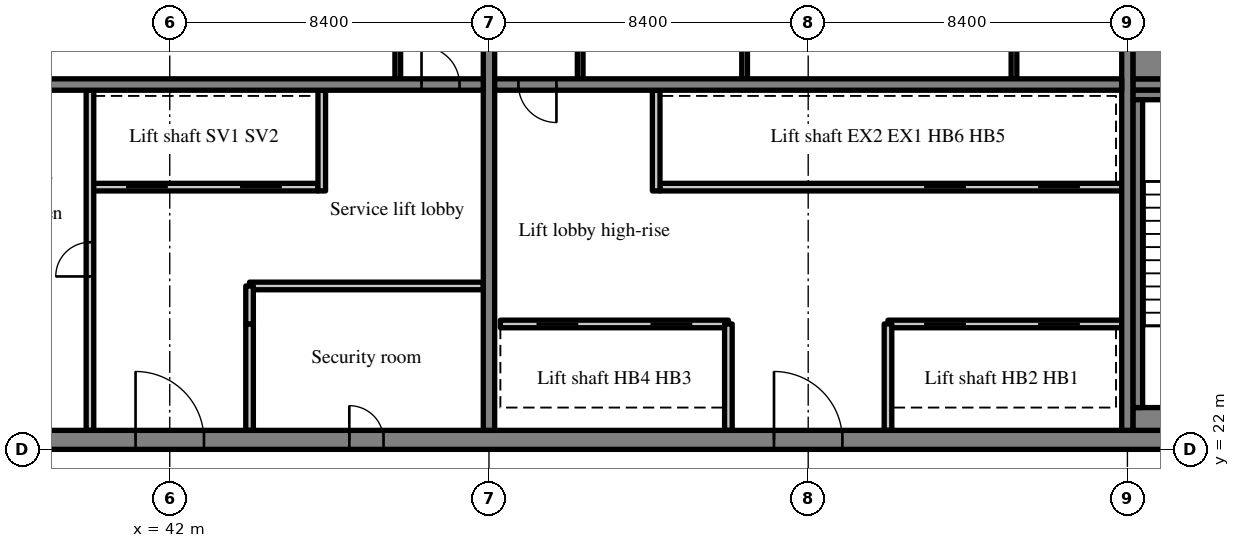
"""IFC4 building model, lengths in metres.
Left out: names, types, materials, properties, quantities, classifications, styles, units other than length and angle.
Written with IfcOpenShell. Run it as: python <this file> out.ifc"""

import sys

from ifc_helpers import new_model, si_unit, direction, frame, frame_2d, origin, place, context, subcontext, project, spatial, rectangle, extrude, source, transform, mapped, element, fill, save


model = new_model("IFC4")
c1 = context("Model", 3, precision=1e-05, world=origin(), true_north=direction((0.0, 1.0)))
c2 = subcontext(c1, "Body", "Model", "MODEL_VIEW")
j1 = project(units=[si_unit("LENGTHUNIT", "METRE"), si_unit("PLANEANGLEUNIT", "RADIAN")], contexts=[c1])
p1 = place(None, origin())
s1 = spatial("IfcSite", under=j1, at=p1, CompositionType="ELEMENT")
p2 = place(p1, origin())
s2 = spatial("IfcBuilding", under=s1, at=p2, CompositionType="ELEMENT")
p3 = place(p2, frame((0.0, 0.0, 289.7)))
s3 = spatial("IfcBuildingStorey", under=s2, at=p3, CompositionType="ELEMENT", Elevation=289.7)
m1 = source(origin(), c2, "Body", "SweptSolid", [
    extrude(rectangle(XDim=50.4, YDim=0.5, at=frame_2d((25.2, 0.0))), origin(), (0.0, 0.0, 1.0), 3.72),
])
p4 = place(p3, frame((25.2, 22.25, 0.0), z_axis=(0.0, 0.0, 1.0), x_axis=(1.0, 0.0, 0.0)))
e1 = element("IfcWall", 1, at=p4, inside=s3, PredefinedType="SHEAR", context=c2, shape_type="MappedRepresentation", body=[
    mapped(m1, transform((0.0, 0.0, 0.0), scale=1.0)),
])
m2 = source(origin(), c2, "Body", "SweptSolid", [
    extrude(rectangle(XDim=1.8, YDim=2.1, at=frame_2d((0.9, 1.05))), frame((0.0, 0.26, 0.0), z_axis=(0.0, -1.0, 0.0), x_axis=(1.0, 0.0, 0.0)), (0.0, 0.0, 1.0), 0.52),
])
p5 = place(p4, frame((15.9, 0.0, 0.0)))
e2 = element("IfcOpeningElement", 2, at=p5, cuts=e1, PredefinedType="OPENING", context=c2, shape_type="MappedRepresentation", body=[
    mapped(m2, transform((0.0, 0.0, 0.0), scale=1.0)),
])
m3 = source(origin(), c2, "Body", "SweptSolid", [
    extrude(rectangle(XDim=0.9, YDim=2.1, at=frame_2d((0.45, 1.05))), frame((0.0, 0.26, 0.0), z_axis=(0.0, -1.0, 0.0), x_axis=(1.0, 0.0, 0.0)), (0.0, 0.0, 1.0), 0.52),
])
p6 = place(p4, frame((9.675, 0.0, 0.0)))
e3 = element("IfcOpeningElement", 3, at=p6, cuts=e1, PredefinedType="OPENING", context=c2, shape_type="MappedRepresentation", body=[
    mapped(m3, transform((0.0, 0.0, 0.0), scale=1.0)),
])
p7 = place(p4, frame((21.525, 0.0, 0.0)))
e4 = element("IfcOpeningElement", 4, at=p7, cuts=e1, PredefinedType="OPENING", context=c2, shape_type="MappedRepresentation", body=[
    mapped(m3, transform((0.0, 0.0, 0.0), scale=1.0)),
])
p8 = place(p4, frame((32.7, 0.0, 0.0)))
e5 = element("IfcOpeningElement", 5, at=p8, cuts=e1, PredefinedType="OPENING", context=c2, shape_type="MappedRepresentation", body=[
    mapped(m2, transform((0.0, 0.0, 0.0), scale=1.0)),
])
m4 = source(origin(), c2, "Body", "SweptSolid", [
    extrude(rectangle(XDim=1.2, YDim=2.1, at=frame_2d((0.6, 1.05))), frame((0.0, 0.26, 0.0), z_axis=(0.0, -1.0, 0.0), x_axis=(1.0, 0.0, 0.0)), (0.0, 0.0, 1.0), 0.52),
])
p9 = place(p4, frame((6.5, 0.0, 0.0)))
e6 = element("IfcOpeningElement", 6, at=p9, cuts=e1, PredefinedType="OPENING", context=c2, shape_type="MappedRepresentation", body=[
    mapped(m4, transform((0.0, 0.0, 0.0), scale=1.0)),
])
p10 = place(p4, frame((47.975, 0.0, 0.0)))
e7 = element("IfcOpeningElement", 7, at=p10, cuts=e1, PredefinedType="OPENING", context=c2, shape_type="MappedRepresentation", body=[
    mapped(m4, transform((0.0, 0.0, 0.0), scale=1.0)),
])
m5 = source(origin(), c2, "Body", "SweptSolid", [
    extrude(rectangle(XDim=19.0, YDim=0.3, at=frame_2d((9.5, 0.0))), origin(), (0.0, 0.0, 1.0), 3.72),
])
p11 = place(p3, frame((50.4, 22.5, 0.0), z_axis=(0.0, 0.0, 1.0), x_axis=(0.0, 1.0, 0.0)))
e8 = element("IfcWall", 8, at=p11, inside=s3, PredefinedType="SHEAR", context=c2, shape_type="MappedRepresentation", body=[
    mapped(m5, transform((0.0, 0.0, 0.0), scale=1.0)),
])
m6 = source(origin(), c2, "Body", "SweptSolid", [
    extrude(rectangle(XDim=1.1, YDim=2.1, at=frame_2d((0.55, 1.05))), frame((0.0, 0.16, 0.0), z_axis=(0.0, -1.0, 0.0), x_axis=(1.0, 0.0, 0.0)), (0.0, 0.0, 1.0), 0.32),
])
p12 = place(p11, frame((12.95, 0.0, 0.0)))
e9 = element("IfcOpeningElement", 9, at=p12, cuts=e8, PredefinedType="OPENING", context=c2, shape_type="MappedRepresentation", body=[
    mapped(m6, transform((0.0, 0.0, 0.0), scale=1.0)),
])
p13 = place(p3, frame((67.2, 22.5, 0.0), z_axis=(0.0, 0.0, 1.0), x_axis=(0.0, 1.0, 0.0)))
e10 = element("IfcWall", 10, at=p13, inside=s3, PredefinedType="SHEAR", context=c2, shape_type="MappedRepresentation", body=[
    mapped(m5, transform((0.0, 0.0, 0.0), scale=1.0)),
])
m7 = source(origin(), c2, "Body", "SweptSolid", [
    extrude(rectangle(XDim=16.5, YDim=0.3, at=frame_2d((8.25, 0.0))), origin(), (0.0, 0.0, 1.0), 3.72),
])
p14 = place(p3, frame((33.75, 31.6, 0.0), z_axis=(0.0, 0.0, 1.0), x_axis=(1.0, 0.0, 0.0)))
e11 = element("IfcWall", 11, at=p14, inside=s3, PredefinedType="SHEAR", context=c2, shape_type="MappedRepresentation", body=[
    mapped(m7, transform((0.0, 0.0, 0.0), scale=1.0)),
])
m8 = source(origin(), c2, "Body", "SweptSolid", [
    extrude(rectangle(XDim=1.0, YDim=2.1, at=frame_2d((0.5, 1.05))), frame((0.0, 0.16, 0.0), z_axis=(0.0, -1.0, 0.0), x_axis=(1.0, 0.0, 0.0)), (0.0, 0.0, 1.0), 0.32),
])
p15 = place(p14, frame((14.875, 0.0, 0.0)))
e12 = element("IfcOpeningElement", 12, at=p15, cuts=e11, PredefinedType="OPENING", context=c2, shape_type="MappedRepresentation", body=[
    mapped(m8, transform((0.0, 0.0, 0.0), scale=1.0)),
])
p16 = place(p3, frame((50.55, 31.6, 0.0), z_axis=(0.0, 0.0, 1.0), x_axis=(1.0, 0.0, 0.0)))
e13 = element("IfcWall", 13, at=p16, inside=s3, PredefinedType="SHEAR", context=c2, shape_type="MappedRepresentation", body=[
    mapped(m7, transform((0.0, 0.0, 0.0), scale=1.0)),
])
p17 = place(p16, frame((0.625, 0.0, 0.0)))
e14 = element("IfcOpeningElement", 14, at=p17, cuts=e13, PredefinedType="OPENING", context=c2, shape_type="MappedRepresentation", body=[
    mapped(m8, transform((0.0, 0.0, 0.0), scale=1.0)),
])
m9 = source(origin(), c2, "Body", "SweptSolid", [
    extrude(rectangle(XDim=7.75, YDim=0.3, at=frame_2d((3.875, 0.0))), origin(), (0.0, 0.0, 1.0), 3.72),
])
p18 = place(p3, frame((67.35, 31.6, 0.0), z_axis=(0.0, 0.0, 1.0), x_axis=(1.0, 0.0, 0.0)))
e15 = element("IfcWall", 15, at=p18, inside=s3, PredefinedType="SHEAR", context=c2, shape_type="MappedRepresentation", body=[
    mapped(m9, transform((0.0, 0.0, 0.0), scale=1.0)),
])
p19 = place(p18, frame((5.875, 0.0, 0.0)))
e16 = element("IfcOpeningElement", 16, at=p19, cuts=e15, PredefinedType="OPENING", context=c2, shape_type="MappedRepresentation", body=[
    mapped(m6, transform((0.0, 0.0, 0.0), scale=1.0)),
])
m10 = source(origin(), c2, "Body", "SweptSolid", [
    extrude(rectangle(XDim=6.0, YDim=0.2, at=frame_2d((3.0, 0.0))), origin(), (0.0, 0.0, 1.0), 3.72),
])
p20 = place(p3, frame((39.9, 28.9, 0.0), z_axis=(0.0, 0.0, 1.0), x_axis=(1.0, 0.0, 0.0)))
e17 = element("IfcWall", 17, at=p20, inside=s3, PredefinedType="SOLIDWALL", context=c2, shape_type="MappedRepresentation", body=[
    mapped(m10, transform((0.0, 0.0, 0.0), scale=1.0)),
])
m11 = source(origin(), c2, "Body", "SweptSolid", [
    extrude(rectangle(XDim=1.1, YDim=2.1, at=frame_2d((0.55, 1.05))), frame((0.0, 0.11, 0.0), z_axis=(0.0, -1.0, 0.0), x_axis=(1.0, 0.0, 0.0)), (0.0, 0.0, 1.0), 0.22),
])
p21 = place(p20, frame((0.95, 0.0, 0.0)))
e18 = element("IfcOpeningElement", 18, at=p21, cuts=e17, PredefinedType="OPENING", context=c2, shape_type="MappedRepresentation", body=[
    mapped(m11, transform((0.0, 0.0, 0.0), scale=1.0)),
])
p22 = place(p20, frame((3.95, 0.0, 0.0)))
e19 = element("IfcOpeningElement", 19, at=p22, cuts=e17, PredefinedType="OPENING", context=c2, shape_type="MappedRepresentation", body=[
    mapped(m11, transform((0.0, 0.0, 0.0), scale=1.0)),
])
m12 = source(origin(), c2, "Body", "SweptSolid", [
    extrude(rectangle(XDim=8.95, YDim=0.2, at=frame_2d((4.475, 0.0))), origin(), (0.0, 0.0, 1.0), 3.72),
])
p23 = place(p3, frame((39.9, 22.5, 0.0), z_axis=(0.0, 0.0, 1.0), x_axis=(0.0, 1.0, 0.0)))
e20 = element("IfcWall", 20, at=p23, inside=s3, PredefinedType="PARTITIONING", context=c2, shape_type="MappedRepresentation", body=[
    mapped(m12, transform((0.0, 0.0, 0.0), scale=1.0)),
])
m13 = source(origin(), c2, "Body", "SweptSolid", [
    extrude(rectangle(XDim=0.9, YDim=2.1, at=frame_2d((0.45, 1.05))), frame((0.0, 0.11, 0.0), z_axis=(0.0, -1.0, 0.0), x_axis=(1.0, 0.0, 0.0)), (0.0, 0.0, 1.0), 0.22),
])
p24 = place(p23, frame((4.05, 0.0, 0.0)))
e21 = element("IfcOpeningElement", 21, at=p24, cuts=e20, PredefinedType="OPENING", context=c2, shape_type="MappedRepresentation", body=[
    mapped(m13, transform((0.0, 0.0, 0.0), scale=1.0)),
])
m14 = source(origin(), c2, "Body", "SweptSolid", [
    extrude(rectangle(XDim=2.8, YDim=0.2, at=frame_2d((1.4, 0.0))), origin(), (0.0, 0.0, 1.0), 3.72),
])
p25 = place(p3, frame((44.1, 22.5, 0.0), z_axis=(0.0, 0.0, 1.0), x_axis=(0.0, 1.0, 0.0)))
e22 = element("IfcWall", 22, at=p25, inside=s3, PredefinedType="PARTITIONING", context=c2, shape_type="MappedRepresentation", body=[
    mapped(m14, transform((0.0, 0.0, 0.0), scale=1.0)),
])
m15 = source(origin(), c2, "Body", "SweptSolid", [
    extrude(rectangle(XDim=2.65, YDim=0.2, at=frame_2d((1.325, 0.0))), origin(), (0.0, 0.0, 1.0), 3.72),
])
p26 = place(p3, frame((46.0, 28.8, 0.0), z_axis=(0.0, 0.0, 1.0), x_axis=(0.0, 1.0, 0.0)))
e23 = element("IfcWall", 23, at=p26, inside=s3, PredefinedType="SOLIDWALL", context=c2, shape_type="MappedRepresentation", body=[
    mapped(m15, transform((0.0, 0.0, 0.0), scale=1.0)),
])
m16 = source(origin(), c2, "Body", "SweptSolid", [
    extrude(rectangle(XDim=6.15, YDim=0.2, at=frame_2d((3.075, 0.0))), origin(), (0.0, 0.0, 1.0), 3.72),
])
p27 = place(p3, frame((44.1, 26.3, 0.0), z_axis=(0.0, 0.0, 1.0), x_axis=(1.0, 0.0, 0.0)))
e24 = element("IfcWall", 24, at=p27, inside=s3, PredefinedType="PARTITIONING", context=c2, shape_type="MappedRepresentation", body=[
    mapped(m16, transform((0.0, 0.0, 0.0), scale=1.0)),
])
m17 = source(origin(), c2, "Body", "SweptSolid", [
    extrude(rectangle(XDim=1.0, YDim=0.2, at=frame_2d((0.5, 0.0))), origin(), (0.0, 0.0, 1.0), 3.72),
])
p28 = place(p3, frame((44.1, 25.3, 0.0), z_axis=(0.0, 0.0, 1.0), x_axis=(0.0, 1.0, 0.0)))
e25 = element("IfcWall", 25, at=p28, inside=s3, PredefinedType="PARTITIONING", context=c2, shape_type="MappedRepresentation", body=[
    mapped(m17, transform((0.0, 0.0, 0.0), scale=1.0)),
])
m18 = source(origin(), c2, "Body", "SweptSolid", [
    extrude(rectangle(XDim=3.25, YDim=0.15, at=frame_2d((1.625, 0.0))), origin(), (0.0, 0.0, 1.0), 3.72),
])
p29 = place(p3, frame((48.0, 31.75, 0.0), z_axis=(0.0, 0.0, 1.0), x_axis=(0.0, 1.0, 0.0)))
e26 = element("IfcWall", 26, at=p29, inside=s3, PredefinedType="PARTITIONING", context=c2, shape_type="MappedRepresentation", body=[
    mapped(m18, transform((0.0, 0.0, 0.0), scale=1.0)),
])
m19 = source(origin(), c2, "Body", "SweptSolid", [
    extrude(rectangle(XDim=6.15, YDim=0.2, at=frame_2d((3.075, 0.0))), origin(), (0.0, 0.0, 1.0), 3.72),
])
p30 = place(p3, frame((67.05, 25.3, 0.0), z_axis=(0.0, 0.0, 1.0), x_axis=(-1.0, 0.0, 0.0)))
e27 = element("IfcWall", 27, at=p30, inside=s3, PredefinedType="SOLIDWALL", context=c2, shape_type="MappedRepresentation", body=[
    mapped(m19, transform((0.0, 0.0, 0.0), scale=1.0)),
])
p31 = place(p30, frame((1.1, 0.0, 0.0)))
e28 = element("IfcOpeningElement", 28, at=p31, cuts=e27, PredefinedType="OPENING", context=c2, shape_type="MappedRepresentation", body=[
    mapped(m11, transform((0.0, 0.0, 0.0), scale=1.0)),
])
p32 = place(p30, frame((4.1, 0.0, 0.0)))
e29 = element("IfcOpeningElement", 29, at=p32, cuts=e27, PredefinedType="OPENING", context=c2, shape_type="MappedRepresentation", body=[
    mapped(m11, transform((0.0, 0.0, 0.0), scale=1.0)),
])
p33 = place(p3, frame((56.7, 25.3, 0.0), z_axis=(0.0, 0.0, 1.0), x_axis=(-1.0, 0.0, 0.0)))
e30 = element("IfcWall", 30, at=p33, inside=s3, PredefinedType="SOLIDWALL", context=c2, shape_type="MappedRepresentation", body=[
    mapped(m10, transform((0.0, 0.0, 0.0), scale=1.0)),
])
p34 = place(p33, frame((0.95, 0.0, 0.0)))
e31 = element("IfcOpeningElement", 31, at=p34, cuts=e30, PredefinedType="OPENING", context=c2, shape_type="MappedRepresentation", body=[
    mapped(m11, transform((0.0, 0.0, 0.0), scale=1.0)),
])
p35 = place(p33, frame((3.95, 0.0, 0.0)))
e32 = element("IfcOpeningElement", 32, at=p35, cuts=e30, PredefinedType="OPENING", context=c2, shape_type="MappedRepresentation", body=[
    mapped(m11, transform((0.0, 0.0, 0.0), scale=1.0)),
])
m20 = source(origin(), c2, "Body", "SweptSolid", [
    extrude(rectangle(XDim=12.15, YDim=0.2, at=frame_2d((6.075, 0.0))), origin(), (0.0, 0.0, 1.0), 3.72),
])
p36 = place(p3, frame((67.05, 28.9, 0.0), z_axis=(0.0, 0.0, 1.0), x_axis=(-1.0, 0.0, 0.0)))
e33 = element("IfcWall", 33, at=p36, inside=s3, PredefinedType="SOLIDWALL", context=c2, shape_type="MappedRepresentation", body=[
    mapped(m20, transform((0.0, 0.0, 0.0), scale=1.0)),
])
p37 = place(p36, frame((1.1, 0.0, 0.0)))
e34 = element("IfcOpeningElement", 34, at=p37, cuts=e33, PredefinedType="OPENING", context=c2, shape_type="MappedRepresentation", body=[
    mapped(m11, transform((0.0, 0.0, 0.0), scale=1.0)),
])
p38 = place(p36, frame((4.1, 0.0, 0.0)))
e35 = element("IfcOpeningElement", 35, at=p38, cuts=e33, PredefinedType="OPENING", context=c2, shape_type="MappedRepresentation", body=[
    mapped(m11, transform((0.0, 0.0, 0.0), scale=1.0)),
])
for number, where, z_axis, x_axis in (
    (36, (60.9, 22.5, 0.0), (0.0, 0.0, 1.0), (0.0, 1.0, 0.0)),
    (37, (56.7, 22.5, 0.0), (0.0, 0.0, 1.0), (0.0, 1.0, 0.0)),
):
    element("IfcWall", number, at=place(p3, frame(where, z_axis=z_axis, x_axis=x_axis)), inside=s3, PredefinedType="SOLIDWALL", context=c2, shape_type="MappedRepresentation", body=[
        mapped(m14, transform((0.0, 0.0, 0.0), scale=1.0)),
    ])
p39 = place(p3, frame((54.8, 28.8, 0.0), z_axis=(0.0, 0.0, 1.0), x_axis=(0.0, 1.0, 0.0)))
e38 = element("IfcWall", 38, at=p39, inside=s3, PredefinedType="SOLIDWALL", context=c2, shape_type="MappedRepresentation", body=[
    mapped(m15, transform((0.0, 0.0, 0.0), scale=1.0)),
])
for number, where, z_axis, x_axis in (
    (39, (52.8, 31.75, 0.0), (0.0, 0.0, 1.0), (0.0, 1.0, 0.0)),
    (40, (64.215, 31.75, 0.0), (0.0, 0.0, 1.0), (0.0, 1.0, 0.0)),
    (41, (57.127, 31.75, 0.0), (0.0, 0.0, 1.0), (0.0, 1.0, 0.0)),
):
    element("IfcWall", number, at=place(p3, frame(where, z_axis=z_axis, x_axis=x_axis)), inside=s3, PredefinedType="PARTITIONING", context=c2, shape_type="MappedRepresentation", body=[
        mapped(m18, transform((0.0, 0.0, 0.0), scale=1.0)),
    ])
m21 = source(origin(), c2, "Body", "SweptSolid", [
    extrude(rectangle(XDim=4.9, YDim=0.6, at=frame_2d((2.45, 0.0))), origin(), (0.0, 0.0, 1.0), 3.72),
])
p40 = place(p3, frame((67.35, 22.8, 0.0), z_axis=(0.0, 0.0, 1.0), x_axis=(1.0, 0.0, 0.0)))
e42 = element("IfcWall", 42, at=p40, inside=s3, PredefinedType="SOLIDWALL", context=c2, shape_type="MappedRepresentation", body=[
    mapped(m21, transform((0.0, 0.0, 0.0), scale=1.0)),
])
m22 = source(origin(), c2, "Body", "SweptSolid", [
    extrude(rectangle(XDim=4.9, YDim=0.25, at=frame_2d((2.45, 0.0))), origin(), (0.0, 0.0, 1.0), 3.72),
])
p41 = place(p3, frame((67.35, 31.325, 0.0), z_axis=(0.0, 0.0, 1.0), x_axis=(1.0, 0.0, 0.0)))
e43 = element("IfcWall", 43, at=p41, inside=s3, PredefinedType="SOLIDWALL", context=c2, shape_type="MappedRepresentation", body=[
    mapped(m22, transform((0.0, 0.0, 0.0), scale=1.0)),
])
m23 = source(origin(), c2, "Body", "SweptSolid", [
    extrude(rectangle(XDim=8.1, YDim=0.25, at=frame_2d((4.05, 0.0))), origin(), (0.0, 0.0, 1.0), 3.72),
])
p42 = place(p3, frame((67.475, 23.1, 0.0), z_axis=(0.0, 0.0, 1.0), x_axis=(0.0, 1.0, 0.0)))
e44 = element("IfcWall", 44, at=p42, inside=s3, PredefinedType="SOLIDWALL", context=c2, shape_type="MappedRepresentation", body=[
    mapped(m23, transform((0.0, 0.0, 0.0), scale=1.0)),
])
m24 = source(origin(), c2, "Body", "SweptSolid", [
    extrude(rectangle(XDim=4.9, YDim=1.05, at=frame_2d((2.45, 0.0))), origin(), (0.0, 0.0, 1.0), 3.72),
])
p43 = place(p3, frame((67.35, 32.275, 0.0), z_axis=(0.0, 0.0, 1.0), x_axis=(1.0, 0.0, 0.0)))
e45 = element("IfcWall", 45, at=p43, inside=s3, PredefinedType="SOLIDWALL", context=c2, shape_type="MappedRepresentation", body=[
    mapped(m24, transform((0.0, 0.0, 0.0), scale=1.0)),
])
m25 = source(origin(), c2, "Body", "SweptSolid", [
    extrude(rectangle(XDim=1.8, YDim=2.1, at=frame_2d((0.9, 1.05))), frame((0.0, 0.175, 0.0), z_axis=(0.0, -1.0, 0.0), x_axis=(1.0, 0.0, 0.0)), (0.0, 0.0, 1.0), 0.05),
])
p44 = place(p5, origin())
e46 = element("IfcDoor", 46, at=p44, inside=s3, OperationType="DOUBLE_DOOR_SINGLE_SWING", PredefinedType="DOOR", context=c2, shape_type="MappedRepresentation", body=[
    mapped(m25, transform((0.0, 0.0, 0.0), scale=1.0)),
])
fill(e2, e46)
m26 = source(origin(), c2, "Body", "SweptSolid", [
    extrude(rectangle(XDim=1.0, YDim=2.1, at=frame_2d((0.5, 1.05))), frame((0.0, 0.025, 0.0), z_axis=(0.0, -1.0, 0.0), x_axis=(1.0, 0.0, 0.0)), (0.0, 0.0, 1.0), 0.05),
])
p45 = place(p15, origin())
e47 = element("IfcDoor", 47, at=p45, inside=s3, OperationType="SINGLE_SWING_LEFT", PredefinedType="DOOR", context=c2, shape_type="MappedRepresentation", body=[
    mapped(m26, transform((0.0, 0.0, 0.0), scale=1.0)),
])
fill(e12, e47)
m27 = source(origin(), c2, "Body", "SweptSolid", [
    extrude(rectangle(XDim=1.1, YDim=2.1, at=frame_2d((0.55, 1.05))), frame((0.0, 0.025, 0.0), z_axis=(0.0, -1.0, 0.0), x_axis=(1.0, 0.0, 0.0)), (0.0, 0.0, 1.0), 0.05),
])
p46 = place(p21, origin())
e48 = element("IfcDoor", 48, at=p46, inside=s3, OperationType="SLIDING_TO_LEFT", PredefinedType="DOOR", context=c2, shape_type="MappedRepresentation", body=[
    mapped(m27, transform((0.0, 0.0, 0.0), scale=1.0)),
])
fill(e18, e48)
p47 = place(p22, origin())
e49 = element("IfcDoor", 49, at=p47, inside=s3, OperationType="SLIDING_TO_RIGHT", PredefinedType="DOOR", context=c2, shape_type="MappedRepresentation", body=[
    mapped(m27, transform((0.0, 0.0, 0.0), scale=1.0)),
])
fill(e19, e49)
m28 = source(origin(), c2, "Body", "SweptSolid", [
    extrude(rectangle(XDim=0.9, YDim=2.1, at=frame_2d((0.45, 1.05))), frame((0.0, 0.025, 0.0), z_axis=(0.0, -1.0, 0.0), x_axis=(1.0, 0.0, 0.0)), (0.0, 0.0, 1.0), 0.05),
])
p48 = place(p24, origin())
e50 = element("IfcDoor", 50, at=p48, inside=s3, OperationType="SINGLE_SWING_LEFT", PredefinedType="DOOR", context=c2, shape_type="MappedRepresentation", body=[
    mapped(m28, transform((0.0, 0.0, 0.0), scale=1.0)),
])
fill(e21, e50)
m29 = source(origin(), c2, "Body", "SweptSolid", [
    extrude(rectangle(XDim=0.9, YDim=2.1, at=frame_2d((0.45, 1.05))), frame((0.0, 0.175, 0.0), z_axis=(0.0, -1.0, 0.0), x_axis=(1.0, 0.0, 0.0)), (0.0, 0.0, 1.0), 0.05),
])
p49 = place(p7, origin())
e51 = element("IfcDoor", 51, at=p49, inside=s3, OperationType="SINGLE_SWING_LEFT", PredefinedType="DOOR", context=c2, shape_type="MappedRepresentation", body=[
    mapped(m29, transform((0.0, 0.0, 0.0), scale=1.0)),
])
fill(e4, e51)
p50 = place(p8, origin())
e52 = element("IfcDoor", 52, at=p50, inside=s3, OperationType="DOUBLE_DOOR_SINGLE_SWING", PredefinedType="DOOR", context=c2, shape_type="MappedRepresentation", body=[
    mapped(m25, transform((0.0, 0.0, 0.0), scale=1.0)),
])
fill(e5, e52)
p51 = place(p17, origin())
e53 = element("IfcDoor", 53, at=p51, inside=s3, OperationType="SINGLE_SWING_RIGHT", PredefinedType="DOOR", context=c2, shape_type="MappedRepresentation", body=[
    mapped(m26, transform((0.0, 0.0, 0.0), scale=1.0)),
])
fill(e14, e53)
p52 = place(p31, origin())
e54 = element("IfcDoor", 54, at=p52, inside=s3, OperationType="SLIDING_TO_RIGHT", PredefinedType="DOOR", context=c2, shape_type="MappedRepresentation", body=[
    mapped(m27, transform((0.0, 0.0, 0.0), scale=1.0)),
])
fill(e28, e54)
p53 = place(p32, origin())
e55 = element("IfcDoor", 55, at=p53, inside=s3, OperationType="SLIDING_TO_LEFT", PredefinedType="DOOR", context=c2, shape_type="MappedRepresentation", body=[
    mapped(m27, transform((0.0, 0.0, 0.0), scale=1.0)),
])
fill(e29, e55)
p54 = place(p34, origin())
e56 = element("IfcDoor", 56, at=p54, inside=s3, OperationType="SLIDING_TO_RIGHT", PredefinedType="DOOR", context=c2, shape_type="MappedRepresentation", body=[
    mapped(m27, transform((0.0, 0.0, 0.0), scale=1.0)),
])
fill(e31, e56)
p55 = place(p35, origin())
e57 = element("IfcDoor", 57, at=p55, inside=s3, OperationType="SLIDING_TO_LEFT", PredefinedType="DOOR", context=c2, shape_type="MappedRepresentation", body=[
    mapped(m27, transform((0.0, 0.0, 0.0), scale=1.0)),
])
fill(e32, e57)
p56 = place(p37, origin())
e58 = element("IfcDoor", 58, at=p56, inside=s3, OperationType="SLIDING_TO_RIGHT", PredefinedType="DOOR", context=c2, shape_type="MappedRepresentation", body=[
    mapped(m27, transform((0.0, 0.0, 0.0), scale=1.0)),
])
fill(e34, e58)
p57 = place(p38, origin())
e59 = element("IfcDoor", 59, at=p57, inside=s3, OperationType="SLIDING_TO_LEFT", PredefinedType="DOOR", context=c2, shape_type="MappedRepresentation", body=[
    mapped(m27, transform((0.0, 0.0, 0.0), scale=1.0)),
])
fill(e35, e59)
save(model, sys.argv[1])
